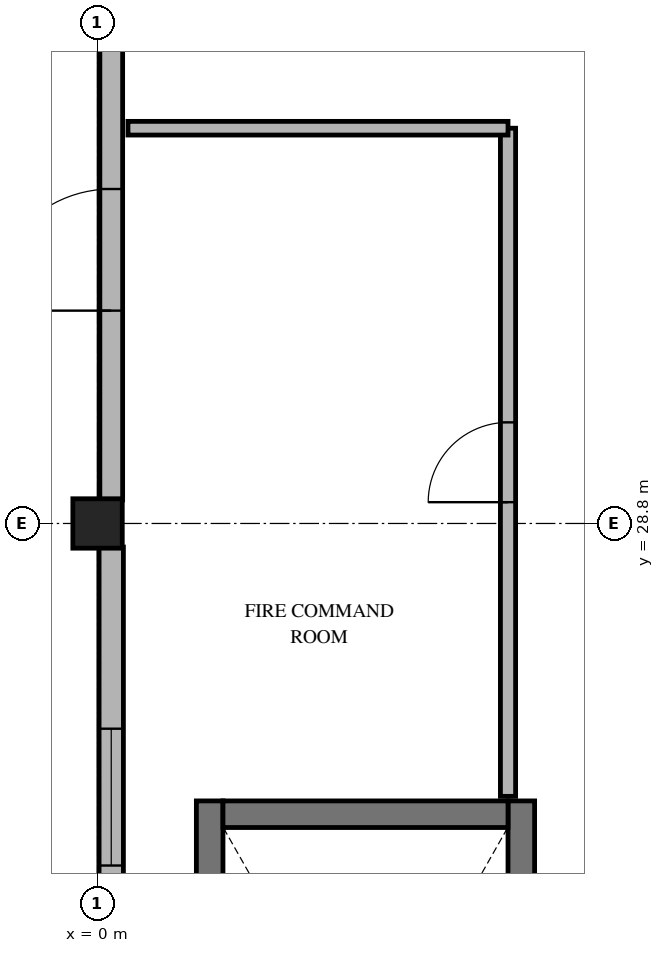
"""IFC4 building model, lengths in metres.
Left out: names, types, materials, properties, quantities, classifications, styles, units other than length and angle.
Written with IfcOpenShell. Run it as: python <this file> out.ifc"""

import sys

from ifc_helpers import new_model, si_unit, direction, frame, frame_2d, origin, origin_2d, place, context, subcontext, project, spatial, rectangle, extrude, element, fill, save


model = new_model("IFC4")
c1 = context("Model", 3, precision=1e-05, world=origin(), true_north=direction((0.0, 1.0)))
c2 = subcontext(c1, "Body", "Model", "MODEL_VIEW")
j1 = project(units=[si_unit("LENGTHUNIT", "METRE"), si_unit("PLANEANGLEUNIT", "RADIAN")], contexts=[c1])
p1 = place(None, origin())
s1 = spatial("IfcSite", under=j1, at=p1, CompositionType="ELEMENT")
p2 = place(p1, origin())
s2 = spatial("IfcBuilding", under=s1, at=p2, CompositionType="ELEMENT")
p3 = place(p2, origin())
s3 = spatial("IfcBuildingStorey", under=s2, at=p3, CompositionType="ELEMENT", Elevation=0.0)
p4 = place(p3, frame((0.0, 28.8, 0.0), z_axis=(0.0, 0.0, 1.0), x_axis=(1.0, 0.0, 0.0)))
e1 = element("IfcColumn", 1, at=p4, inside=s3, PredefinedType="COLUMN", context=c2, shape_type="SweptSolid", body=[
    extrude(rectangle(XDim=0.65, YDim=0.65, at=origin_2d()), origin(), (0.0, 0.0, 1.0), 4.5),
])
p5 = place(p3, frame((0.18, 21.91, 0.0), z_axis=(0.0, 0.0, 1.0), x_axis=(0.0, 1.0, 0.0)))
e2 = element("IfcWall", 2, at=p5, inside=s3, PredefinedType="SOLIDWALL", context=c2, shape_type="SweptSolid", body=[
    extrude(rectangle(XDim=6.58, YDim=0.32, at=frame_2d((3.29, 0.0))), origin(), (0.0, 0.0, 1.0), 3.44),
])
p6 = place(p5, frame((2.39, 0.0, 0.75)))
e3 = element("IfcOpeningElement", 3, at=p6, cuts=e2, PredefinedType="OPENING", context=c2, shape_type="SweptSolid", body=[
    extrude(rectangle(XDim=1.8, YDim=1.5, at=frame_2d((0.9, 0.75))), frame((0.0, 0.17, 0.0), z_axis=(0.0, -1.0, 0.0), x_axis=(1.0, 0.0, 0.0)), (0.0, 0.0, 1.0), 0.34),
])
p7 = place(p3, frame((0.18, 29.11, 0.0), z_axis=(0.0, 0.0, 1.0), x_axis=(0.0, 1.0, 0.0)))
e4 = element("IfcWall", 4, at=p7, inside=s3, PredefinedType="SOLIDWALL", context=c2, shape_type="SweptSolid", body=[
    extrude(rectangle(XDim=6.58, YDim=0.3, at=frame_2d((3.29, 0.0))), origin(), (0.0, 0.0, 1.0), 3.49),
])
p8 = place(p7, frame((2.49, 0.0, 0.0)))
e5 = element("IfcOpeningElement", 5, at=p8, cuts=e4, PredefinedType="OPENING", context=c2, shape_type="SweptSolid", body=[
    extrude(rectangle(XDim=1.6, YDim=2.3, at=frame_2d((0.8, 1.15))), frame((0.0, 0.16, 0.0), z_axis=(0.0, -1.0, 0.0), x_axis=(1.0, 0.0, 0.0)), (0.0, 0.0, 1.0), 0.32),
])
for number, where, z_axis, x_axis in (
    (6, (5.575, 16.05, 0.0), (0.0, 0.0, 1.0), (0.0, 1.0, 0.0)),
    (7, (1.475, 25.15, 0.0), (0.0, 0.0, 1.0), (0.0, -1.0, 0.0)),
):
    element("IfcWall", number, at=place(p3, frame(where, z_axis=z_axis, x_axis=x_axis)), inside=s3, PredefinedType="SHEAR", context=c2, shape_type="SweptSolid", body=[
        extrude(rectangle(XDim=9.1, YDim=0.35, at=frame_2d((4.55, 0.0))), origin(), (0.0, 0.0, 1.0), 4.24),
    ])
p9 = place(p3, frame((5.4, 24.975, 0.0), z_axis=(0.0, 0.0, 1.0), x_axis=(-1.0, 0.0, 0.0)))
e8 = element("IfcWall", 8, at=p9, inside=s3, PredefinedType="SHEAR", context=c2, shape_type="SweptSolid", body=[
    extrude(rectangle(XDim=3.75, YDim=0.35, at=frame_2d((1.875, 0.0))), origin(), (0.0, 0.0, 1.0), 4.24),
])
p10 = place(p3, frame((5.4, 25.21, 0.0), z_axis=(0.0, 0.0, 1.0), x_axis=(0.0, 1.0, 0.0)))
e9 = element("IfcWall", 9, at=p10, inside=s3, PredefinedType="PARTITIONING", context=c2, shape_type="SweptSolid", body=[
    extrude(rectangle(XDim=8.79, YDim=0.2, at=frame_2d((4.395, 0.0))), origin(), (0.0, 0.0, 1.0), 3.44),
])
p11 = place(p10, frame((3.87, 0.0, 0.0)))
e10 = element("IfcOpeningElement", 10, at=p11, cuts=e9, PredefinedType="OPENING", context=c2, shape_type="SweptSolid", body=[
    extrude(rectangle(XDim=1.05, YDim=2.15, at=frame_2d((0.525, 1.075))), frame((0.0, 0.11, 0.0), z_axis=(0.0, -1.0, 0.0), x_axis=(1.0, 0.0, 0.0)), (0.0, 0.0, 1.0), 0.22),
])
p12 = place(p3, frame((5.4, 34.0, 0.0), z_axis=(0.0, 0.0, 1.0), x_axis=(-1.0, 0.0, 0.0)))
e11 = element("IfcWall", 11, at=p12, inside=s3, PredefinedType="PARTITIONING", context=c2, shape_type="SweptSolid", body=[
    extrude(rectangle(XDim=5.0, YDim=0.18, at=frame_2d((2.5, 0.0))), origin(), (0.0, 0.0, 1.0), 4.24),
])
p13 = place(p6, origin())
e12 = element("IfcWindow", 12, at=p13, inside=s3, PartitioningType="SINGLE_PANEL", PredefinedType="WINDOW", context=c2, shape_type="SweptSolid", body=[
    extrude(rectangle(XDim=1.8, YDim=1.5, at=frame_2d((0.9, 0.75))), frame((0.0, 0.03, 0.0), z_axis=(0.0, -1.0, 0.0), x_axis=(1.0, 0.0, 0.0)), (0.0, 0.0, 1.0), 0.06),
])
fill(e3, e12)
p14 = place(p8, origin())
e13 = element("IfcDoor", 13, at=p14, inside=s3, OperationType="SINGLE_SWING_LEFT", PredefinedType="DOOR", context=c2, shape_type="SweptSolid", body=[
    extrude(rectangle(XDim=1.6, YDim=2.3, at=frame_2d((0.8, 1.15))), frame((0.0, 0.025, 0.0), z_axis=(0.0, -1.0, 0.0), x_axis=(1.0, 0.0, 0.0)), (0.0, 0.0, 1.0), 0.05),
])
fill(e5, e13)
p15 = place(p11, origin())
e14 = element("IfcDoor", 14, at=p15, inside=s3, OperationType="SINGLE_SWING_LEFT", PredefinedType="DOOR", context=c2, shape_type="SweptSolid", body=[
    extrude(rectangle(XDim=1.05, YDim=2.15, at=frame_2d((0.525, 1.075))), frame((0.0, 0.025, 0.0), z_axis=(0.0, -1.0, 0.0), x_axis=(1.0, 0.0, 0.0)), (0.0, 0.0, 1.0), 0.05),
])
fill(e10, e14)
save(model, sys.argv[1])
